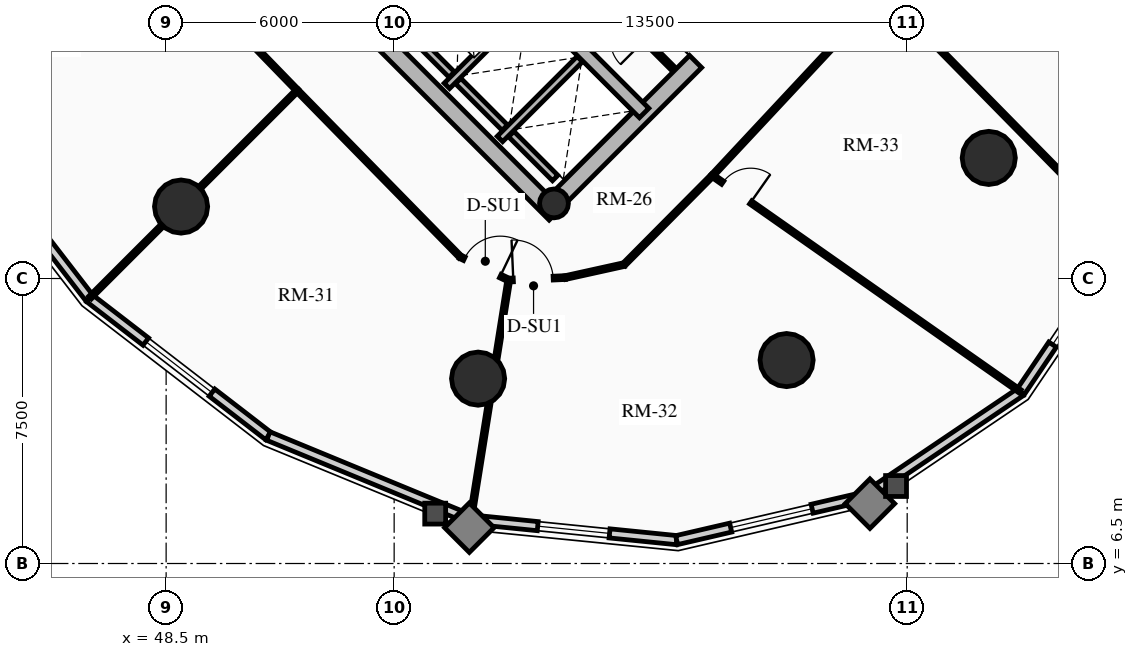
"""IFC4 building model, lengths in metres.
Left out: names, types, materials, properties, quantities, classifications, styles, units other than length and angle.
Written with IfcOpenShell. Run it as: python <this file> out.ifc"""

import sys

from ifc_helpers import new_model, si_unit, direction, frame, frame_2d, origin, origin_2d, place, context, subcontext, project, spatial, rectangle, circle, hollow_circle, extrude, source, transform, mapped, element, fill, save


model = new_model("IFC4")
c1 = context("Model", 3, precision=1e-05, world=origin(), true_north=direction((0.0, 1.0)))
c2 = subcontext(c1, "Body", "Model", "MODEL_VIEW")
j1 = project(units=[si_unit("LENGTHUNIT", "METRE"), si_unit("PLANEANGLEUNIT", "RADIAN")], contexts=[c1])
p1 = place(None, origin())
s1 = spatial("IfcSite", under=j1, at=p1, CompositionType="ELEMENT")
p2 = place(p1, origin())
s2 = spatial("IfcBuilding", under=s1, at=p2, CompositionType="ELEMENT")
p3 = place(p2, frame((0.0, 0.0, 102.16)))
s3 = spatial("IfcBuildingStorey", under=s2, at=p3, CompositionType="ELEMENT", Elevation=102.16)
p4 = place(p3, frame((58.737, 15.697, 0.0), z_axis=(0.0, 0.0, 1.0), x_axis=(-0.707106781187, 0.707106781187, 0.0)))
e1 = element("IfcWall", 1, at=p4, inside=s3, PredefinedType="SHEAR", context=c2, shape_type="SweptSolid", body=[
    extrude(rectangle(XDim=14.2, YDim=0.45, at=frame_2d((7.1, 0.0))), origin(), (0.0, 0.0, 1.0), 2.91),
])
p5 = place(p3, frame((58.578, 15.856, 0.0), z_axis=(0.0, 0.0, 1.0), x_axis=(0.707106781187, 0.707106781187, 0.0)))
e2 = element("IfcWall", 2, at=p5, inside=s3, PredefinedType="SHEAR", context=c2, shape_type="SweptSolid", body=[
    extrude(rectangle(XDim=10.7, YDim=0.45, at=frame_2d((5.35, 0.0))), origin(), (0.0, 0.0, 1.0), 2.91),
])
m1 = source(origin(), c2, "Body", "SweptSolid", [
    extrude(rectangle(XDim=1.5, YDim=2.02, at=frame_2d((0.75, 1.01))), frame((0.0, 0.235, 0.0), z_axis=(0.0, -1.0, 0.0), x_axis=(1.0, 0.0, 0.0)), (0.0, 0.0, 1.0), 0.47),
])
p6 = place(p5, frame((5.45, 0.0, 0.0)))
e3 = element("IfcOpeningElement", 3, at=p6, cuts=e2, PredefinedType="OPENING", context=c2, shape_type="MappedRepresentation", body=[
    mapped(m1, transform((0.0, 0.0, 0.0), x_axis=(1.0, 0.0, 0.0), y_axis=(0.0, 1.0, 0.0), z_axis=(0.0, 0.0, 1.0), scale=1.0)),
])
p7 = place(p3, frame((61.078, 18.355, 0.0), z_axis=(0.0, 0.0, 1.0), x_axis=(-0.707106781187, 0.707106781187, 0.0)))
e4 = element("IfcWall", 4, at=p7, inside=s3, PredefinedType="SHEAR", context=c2, shape_type="SweptSolid", body=[
    extrude(rectangle(XDim=13.75, YDim=0.35, at=frame_2d((6.875, 0.0))), origin(), (0.0, 0.0, 1.0), 2.91),
])
m2 = source(origin(), c2, "Body", "SweptSolid", [
    extrude(rectangle(XDim=1.1, YDim=2.015, at=frame_2d((0.55, 1.007))), frame((0.0, 0.185, 0.0), z_axis=(0.0, -1.0, 0.0), x_axis=(1.0, 0.0, 0.0)), (0.0, 0.0, 1.0), 0.37),
])
p8 = place(p7, frame((4.875, 0.0, 0.0)))
e5 = element("IfcOpeningElement", 5, at=p8, cuts=e4, PredefinedType="OPENING", context=c2, shape_type="MappedRepresentation", body=[
    mapped(m2, transform((0.0, 0.0, 0.0), x_axis=(1.0, 0.0, 0.0), y_axis=(0.0, 1.0, 0.0), z_axis=(0.0, 0.0, 1.0), scale=1.0)),
])
m3 = source(origin(), c2, "Body", "SweptSolid", [
    extrude(rectangle(XDim=1.15, YDim=2.02, at=frame_2d((0.575, 1.01))), frame((0.0, 0.185, 0.0), z_axis=(0.0, -1.0, 0.0), x_axis=(1.0, 0.0, 0.0)), (0.0, 0.0, 1.0), 0.37),
])
p9 = place(p7, frame((7.295, 0.0, 0.0)))
e6 = element("IfcOpeningElement", 6, at=p9, cuts=e4, PredefinedType="OPENING", context=c2, shape_type="MappedRepresentation", body=[
    mapped(m3, transform((0.0, 0.0, 0.0), x_axis=(1.0, 0.0, 0.0), y_axis=(0.0, 1.0, 0.0), z_axis=(0.0, 0.0, 1.0), scale=1.0)),
])
p10 = place(p3, frame((58.706, 15.976, 0.0), z_axis=(0.0, 0.0, 1.0), x_axis=(0.707106781187, 0.707106781187, 0.0)))
e7 = element("IfcColumn", 7, at=p10, inside=s3, PredefinedType="COLUMN", context=c2, shape_type="SweptSolid", body=[
    extrude(hollow_circle(Radius=0.38, WallThickness=0.032, at=origin_2d()), origin(), (0.0, 0.0, 1.0), 2.91),
])
for number, where, z_axis, x_axis in (
    (8, (48.893, 15.893, 0.0), (0.0, 0.0, 1.0), (1.0, 0.0, 0.0)),
    (9, (56.709, 11.365, 0.0), (0.0, 0.0, 1.0), (1.0, 0.0, 0.0)),
    (10, (64.827, 11.854, 0.0), (0.0, 0.0, 1.0), (1.0, 0.0, 0.0)),
    (11, (70.146, 17.173, 0.0), (0.0, 0.0, 1.0), (1.0, 0.0, 0.0)),
):
    element("IfcColumn", number, at=place(p3, frame(where, z_axis=z_axis, x_axis=x_axis)), inside=s3, PredefinedType="USERDEFINED", context=c2, shape_type="SweptSolid", body=[
        extrude(circle(Radius=0.7, at=origin_2d()), origin(), (0.0, 0.0, 1.0), 2.91),
    ])
p11 = place(p3, frame((46.483, 13.483, 0.0), z_axis=(0.0, 0.0, 1.0), x_axis=(-0.61054437102, 0.791982052206, 0.0)))
e12 = element("IfcWall", 12, at=p11, inside=s3, PredefinedType="SOLIDWALL", context=c2, shape_type="SweptSolid", body=[
    extrude(rectangle(XDim=5.942, YDim=0.24, at=frame_2d((2.971, 0.0))), origin(), (0.0, 0.0, 1.0), 2.179),
])
p12 = place(p3, frame((51.189, 9.855, 0.0), z_axis=(0.0, 0.0, 1.0), x_axis=(-0.791982052206, 0.61054437102, 0.0)))
e13 = element("IfcWall", 13, at=p12, inside=s3, PredefinedType="SOLIDWALL", context=c2, shape_type="SweptSolid", body=[
    extrude(rectangle(XDim=5.942, YDim=0.24, at=frame_2d((2.971, 0.0))), origin(), (0.0, 0.0, 1.0), 2.179),
])
m4 = source(origin(), c2, "Body", "SweptSolid", [
    extrude(rectangle(XDim=2.2, YDim=1.35, at=frame_2d((1.1, 0.675))), frame((0.0, 0.13, 0.0), z_axis=(0.0, -1.0, 0.0), x_axis=(1.0, 0.0, 0.0)), (0.0, 0.0, 1.0), 0.26),
])
p13 = place(p12, frame((1.871, 0.0, 0.65)))
e14 = element("IfcOpeningElement", 14, at=p13, cuts=e13, PredefinedType="OPENING", context=c2, shape_type="MappedRepresentation", body=[
    mapped(m4, transform((0.0, 0.0, 0.0), x_axis=(1.0, 0.0, 0.0), y_axis=(0.0, 1.0, 0.0), z_axis=(0.0, 0.0, 1.0), scale=1.0)),
])
p14 = place(p3, frame((56.513, 7.661, 0.0), z_axis=(0.0, 0.0, 1.0), x_axis=(-0.924563909604, 0.381027003055, 0.0)))
e15 = element("IfcWall", 15, at=p14, inside=s3, PredefinedType="SOLIDWALL", context=c2, shape_type="SweptSolid", body=[
    extrude(rectangle(XDim=5.758, YDim=0.24, at=frame_2d((2.879, 0.0))), origin(), (0.0, 0.0, 1.0), 2.179),
])
p15 = place(p3, frame((61.933, 7.115, 0.0), z_axis=(0.0, 0.0, 1.0), x_axis=(-0.994971754311, 0.10015591906, 0.0)))
e16 = element("IfcWall", 16, at=p15, inside=s3, PredefinedType="SOLIDWALL", context=c2, shape_type="SweptSolid", body=[
    extrude(rectangle(XDim=5.448, YDim=0.24, at=frame_2d((2.724, 0.0))), origin(), (0.0, 0.0, 1.0), 2.179),
])
m5 = source(origin(), c2, "Body", "SweptSolid", [
    extrude(rectangle(XDim=1.9, YDim=1.35, at=frame_2d((0.95, 0.675))), frame((0.0, 0.13, 0.0), z_axis=(0.0, -1.0, 0.0), x_axis=(1.0, 0.0, 0.0)), (0.0, 0.0, 1.0), 0.26),
])
p16 = place(p15, frame((1.774, 0.0, 0.65)))
e17 = element("IfcOpeningElement", 17, at=p16, cuts=e16, PredefinedType="OPENING", context=c2, shape_type="MappedRepresentation", body=[
    mapped(m5, transform((0.0, 0.0, 0.0), x_axis=(1.0, 0.0, 0.0), y_axis=(0.0, 1.0, 0.0), z_axis=(0.0, 0.0, 1.0), scale=1.0)),
])
p17 = place(p3, frame((66.92, 8.271, 0.0), z_axis=(0.0, 0.0, 1.0), x_axis=(-0.974165631126, -0.225834725257, 0.0)))
e18 = element("IfcWall", 18, at=p17, inside=s3, PredefinedType="SOLIDWALL", context=c2, shape_type="SweptSolid", body=[
    extrude(rectangle(XDim=5.119, YDim=0.24, at=frame_2d((2.56, 0.0))), origin(), (0.0, 0.0, 1.0), 2.179),
])
p18 = place(p17, frame((1.459, 0.0, 0.65)))
e19 = element("IfcOpeningElement", 19, at=p18, cuts=e18, PredefinedType="OPENING", context=c2, shape_type="MappedRepresentation", body=[
    mapped(m4, transform((0.0, 0.0, 0.0), x_axis=(1.0, 0.0, 0.0), y_axis=(0.0, 1.0, 0.0), z_axis=(0.0, 0.0, 1.0), scale=1.0)),
])
p19 = place(p3, frame((70.985, 11.015, 0.0), z_axis=(0.0, 0.0, 1.0), x_axis=(-0.828781148131, -0.559572880421, 0.0)))
e20 = element("IfcWall", 20, at=p19, inside=s3, PredefinedType="SOLIDWALL", context=c2, shape_type="SweptSolid", body=[
    extrude(rectangle(XDim=4.905, YDim=0.24, at=frame_2d((2.452, 0.0))), origin(), (0.0, 0.0, 1.0), 2.179),
])
p20 = place(p3, frame((73.729, 15.08, 0.0), z_axis=(0.0, 0.0, 1.0), x_axis=(-0.559572880421, -0.828781148131, 0.0)))
e21 = element("IfcWall", 21, at=p20, inside=s3, PredefinedType="SOLIDWALL", context=c2, shape_type="SweptSolid", body=[
    extrude(rectangle(XDim=4.905, YDim=0.24, at=frame_2d((2.452, 0.0))), origin(), (0.0, 0.0, 1.0), 2.179),
])
p21 = place(p20, frame((1.502, 0.0, 0.65)))
e22 = element("IfcOpeningElement", 22, at=p21, cuts=e21, PredefinedType="OPENING", context=c2, shape_type="MappedRepresentation", body=[
    mapped(m5, transform((0.0, 0.0, 0.0), x_axis=(1.0, 0.0, 0.0), y_axis=(0.0, 1.0, 0.0), z_axis=(0.0, 0.0, 1.0), scale=1.0)),
])
p22 = place(p3, frame((55.888, 19.069, 0.0), z_axis=(0.0, 0.0, 1.0), x_axis=(0.707106781187, 0.707106781187, 0.0)))
e23 = element("IfcWall", 23, at=p22, inside=s3, PredefinedType="SHEAR", context=c2, shape_type="SweptSolid", body=[
    extrude(rectangle(XDim=2.97, YDim=0.2, at=frame_2d((1.485, 0.0))), origin(), (0.0, 0.0, 1.0), 2.91),
])
p23 = place(p3, frame((56.015, 19.366, 0.0), z_axis=(0.0, 0.0, 1.0), x_axis=(-0.707106781187, 0.707106781187, 0.0)))
e24 = element("IfcWall", 24, at=p23, inside=s3, PredefinedType="SHEAR", context=c2, shape_type="SweptSolid", body=[
    extrude(rectangle(XDim=2.44, YDim=0.2, at=frame_2d((1.22, 0.0))), origin(), (0.0, 0.0, 1.0), 2.91),
])
p24 = place(p3, frame((57.284, 17.673, 0.0), z_axis=(0.0, 0.0, 1.0), x_axis=(0.707147878904, 0.70706568108, 0.0)))
e25 = element("IfcWall", 25, at=p24, inside=s3, PredefinedType="SHEAR", context=c2, shape_type="SweptSolid", body=[
    extrude(rectangle(XDim=2.97, YDim=0.2, at=frame_2d((1.485, 0.0))), origin(), (0.0, 0.0, 1.0), 2.91),
])
p25 = place(p3, frame((57.412, 17.97, 0.0), z_axis=(0.0, 0.0, 1.0), x_axis=(-0.707106781187, 0.707106781187, 0.0)))
e26 = element("IfcWall", 26, at=p25, inside=s3, PredefinedType="SHEAR", context=c2, shape_type="SweptSolid", body=[
    extrude(rectangle(XDim=1.735, YDim=0.2, at=frame_2d((0.867, 0.0))), origin(), (0.0, 0.0, 1.0), 2.91),
])
p26 = place(p3, frame((58.737, 16.644, 0.0), z_axis=(0.0, 0.0, 1.0), x_axis=(-0.707032117043, 0.707181437447, 0.0)))
e27 = element("IfcWall", 27, at=p26, inside=s3, PredefinedType="SHEAR", context=c2, shape_type="SweptSolid", body=[
    extrude(rectangle(XDim=1.635, YDim=0.2, at=frame_2d((0.817, 0.0))), origin(), (0.0, 0.0, 1.0), 2.91),
])
p27 = place(p3, frame((61.835, 19.529, 0.0), z_axis=(0.0, 0.0, 1.0), x_axis=(-0.707146413884, 0.707067146267, 0.0)))
e28 = element("IfcWall", 28, at=p27, inside=s3, PredefinedType="PARTITIONING", context=c2, shape_type="SweptSolid", body=[
    extrude(rectangle(XDim=3.08, YDim=0.125, at=frame_2d((1.54, 0.0))), origin(), (0.0, 0.0, 1.0), 2.655),
])
m6 = source(origin(), c2, "Body", "SweptSolid", [
    extrude(rectangle(XDim=0.9, YDim=2.005, at=frame_2d((0.45, 1.002))), frame((0.0, 0.073, 0.0), z_axis=(0.0, -1.0, 0.0), x_axis=(1.0, 0.0, 0.0)), (0.0, 0.0, 1.0), 0.145),
])
p28 = place(p27, frame((1.05, 0.0, 0.0)))
e29 = element("IfcOpeningElement", 29, at=p28, cuts=e28, PredefinedType="OPENING", context=c2, shape_type="MappedRepresentation", body=[
    mapped(m6, transform((0.0, 0.0, 0.0), x_axis=(1.0, 0.0, 0.0), y_axis=(0.0, 1.0, 0.0), z_axis=(0.0, 0.0, 1.0), scale=1.0)),
])
p29 = place(p3, frame((47.763, 23.265, 0.0), z_axis=(0.0, 0.0, 1.0), x_axis=(0.696243493404, -0.717805682544, 0.0)))
e30 = element("IfcWall", 30, at=p29, inside=s3, PredefinedType="MOVABLE", context=c2, shape_type="SweptSolid", body=[
    extrude(rectangle(XDim=6.012, YDim=0.1, at=frame_2d((3.006, 0.0))), origin(), (0.0, 0.0, 1.0), 2.655),
])
m7 = source(origin(), c2, "Body", "SweptSolid", [
    extrude(rectangle(XDim=1.05, YDim=2.015, at=frame_2d((0.525, 1.007))), frame((0.0, 0.06, 0.0), z_axis=(0.0, -1.0, 0.0), x_axis=(1.0, 0.0, 0.0)), (0.0, 0.0, 1.0), 0.12),
])
p30 = place(p29, frame((2.481, 0.0, 0.0)))
e31 = element("IfcOpeningElement", 31, at=p30, cuts=e30, PredefinedType="OPENING", context=c2, shape_type="MappedRepresentation", body=[
    mapped(m7, transform((0.0, 0.0, 0.0), x_axis=(1.0, 0.0, 0.0), y_axis=(0.0, 1.0, 0.0), z_axis=(0.0, 0.0, 1.0), scale=1.0)),
])
p31 = place(p3, frame((51.949, 18.949, 0.0), z_axis=(0.0, 0.0, 1.0), x_axis=(0.699840807936, -0.714298847506, 0.0)))
e32 = element("IfcWall", 32, at=p31, inside=s3, PredefinedType="MOVABLE", context=c2, shape_type="SweptSolid", body=[
    extrude(rectangle(XDim=6.13, YDim=0.1, at=frame_2d((3.065, 0.0))), origin(), (0.0, 0.0, 1.0), 2.225),
])
p32 = place(p3, frame((56.239, 14.571, 0.0), z_axis=(0.0, 0.0, 1.0), x_axis=(0.901549955153, -0.432675026278, 0.0)))
e33 = element("IfcWall", 33, at=p32, inside=s3, PredefinedType="MOVABLE", context=c2, shape_type="SweptSolid", body=[
    extrude(rectangle(XDim=1.416, YDim=0.1, at=frame_2d((0.708, 0.0))), origin(), (0.0, 0.0, 1.0), 2.225),
])
p33 = place(p32, frame((0.12, 0.0, 0.0)))
e34 = element("IfcOpeningElement", 34, at=p33, cuts=e33, PredefinedType="OPENING", context=c2, shape_type="MappedRepresentation", body=[
    mapped(m7, transform((0.0, 0.0, 0.0), x_axis=(1.0, 0.0, 0.0), y_axis=(0.0, 1.0, 0.0), z_axis=(0.0, 0.0, 1.0), scale=1.0)),
])
p34 = place(p3, frame((57.516, 13.958, 0.0), z_axis=(0.0, 0.0, 1.0), x_axis=(0.999005711776, 0.044582371387, 0.0)))
e35 = element("IfcWall", 35, at=p34, inside=s3, PredefinedType="MOVABLE", context=c2, shape_type="SweptSolid", body=[
    extrude(rectangle(XDim=1.49, YDim=0.1, at=frame_2d((0.745, 0.0))), origin(), (0.0, 0.0, 1.0), 2.225),
])
p35 = place(p34, frame((0.12, 0.0, 0.0)))
e36 = element("IfcOpeningElement", 36, at=p35, cuts=e35, PredefinedType="OPENING", context=c2, shape_type="MappedRepresentation", body=[
    mapped(m7, transform((0.0, 0.0, 0.0), x_axis=(1.0, 0.0, 0.0), y_axis=(0.0, 1.0, 0.0), z_axis=(0.0, 0.0, 1.0), scale=1.0)),
])
p36 = place(p3, frame((59.004, 14.024, 0.0), z_axis=(0.0, 0.0, 1.0), x_axis=(0.976436847881, 0.215803341262, 0.0)))
e37 = element("IfcWall", 37, at=p36, inside=s3, PredefinedType="MOVABLE", context=c2, shape_type="SweptSolid", body=[
    extrude(rectangle(XDim=1.583, YDim=0.1, at=frame_2d((0.792, 0.0))), origin(), (0.0, 0.0, 1.0), 2.225),
])
p37 = place(p3, frame((60.549, 14.366, 0.0), z_axis=(0.0, 0.0, 1.0), x_axis=(0.704402344516, 0.709800913666, 0.0)))
e38 = element("IfcWall", 38, at=p37, inside=s3, PredefinedType="MOVABLE", context=c2, shape_type="SweptSolid", body=[
    extrude(rectangle(XDim=3.301, YDim=0.1, at=frame_2d((1.651, 0.0))), origin(), (0.0, 0.0, 1.0), 2.225),
])
p38 = place(p3, frame((62.875, 16.709, 0.0), z_axis=(0.0, 0.0, 1.0), x_axis=(0.682290572861, 0.731081099595, 0.0)))
e39 = element("IfcWall", 39, at=p38, inside=s3, PredefinedType="MOVABLE", context=c2, shape_type="SweptSolid", body=[
    extrude(rectangle(XDim=6.6, YDim=0.1, at=frame_2d((3.3, 0.0))), origin(), (0.0, 0.0, 1.0), 2.225),
])
p39 = place(p3, frame((51.949, 18.949, 0.0), z_axis=(0.0, 0.0, 1.0), x_axis=(-0.707106781187, -0.707106781187, 0.0)))
e40 = element("IfcWall", 40, at=p39, inside=s3, PredefinedType="MOVABLE", context=c2, shape_type="SweptSolid", body=[
    extrude(rectangle(XDim=7.711, YDim=0.1, at=frame_2d((3.855, 0.0))), origin(), (0.0, 0.0, 1.0), 2.179),
])
p40 = place(p3, frame((57.516, 13.958, 0.0), z_axis=(0.0, 0.0, 1.0), x_axis=(-0.157313405462, -0.987548729158, 0.0)))
e41 = element("IfcWall", 41, at=p40, inside=s3, PredefinedType="MOVABLE", context=c2, shape_type="SweptSolid", body=[
    extrude(rectangle(XDim=6.357, YDim=0.1, at=frame_2d((3.178, 0.0))), origin(), (0.0, 0.0, 1.0), 2.179),
])
p41 = place(p3, frame((67.378, 21.534, 0.0), z_axis=(0.0, 0.0, 1.0), x_axis=(0.700878918497, -0.713280268622, 0.0)))
e42 = element("IfcWall", 42, at=p41, inside=s3, PredefinedType="MOVABLE", context=c2, shape_type="SweptSolid", body=[
    extrude(rectangle(XDim=9.036, YDim=0.1, at=frame_2d((4.518, 0.0))), origin(), (0.0, 0.0, 1.0), 2.179),
])
p42 = place(p3, frame((62.875, 16.709, 0.0), z_axis=(0.0, 0.0, 1.0), x_axis=(0.818628370173, -0.574323594804, 0.0)))
e43 = element("IfcWall", 43, at=p42, inside=s3, PredefinedType="MOVABLE", context=c2, shape_type="SweptSolid", body=[
    extrude(rectangle(XDim=9.889, YDim=0.1, at=frame_2d((4.945, 0.0))), origin(), (0.0, 0.0, 1.0), 2.179),
])
m8 = source(origin(), c2, "Body", "SweptSolid", [
    extrude(rectangle(XDim=0.9, YDim=2.005, at=frame_2d((0.45, 1.002))), frame((0.0, 0.06, 0.0), z_axis=(0.0, -1.0, 0.0), x_axis=(1.0, 0.0, 0.0)), (0.0, 0.0, 1.0), 0.12),
])
p43 = place(p42, frame((0.33, 0.0, 0.0)))
e44 = element("IfcOpeningElement", 44, at=p43, cuts=e43, PredefinedType="OPENING", context=c2, shape_type="MappedRepresentation", body=[
    mapped(m8, transform((0.0, 0.0, 0.0), x_axis=(1.0, 0.0, 0.0), y_axis=(0.0, 1.0, 0.0), z_axis=(0.0, 0.0, 1.0), scale=1.0)),
])
m9 = source(origin(), c2, "Body", "SweptSolid", [
    extrude(rectangle(XDim=2.2, YDim=1.35, at=frame_2d((1.1, 0.675))), frame((0.0, 0.03, 0.0), z_axis=(0.0, -1.0, 0.0), x_axis=(1.0, 0.0, 0.0)), (0.0, 0.0, 1.0), 0.06),
])
p44 = place(p13, origin())
e45 = element("IfcWindow", 45, at=p44, inside=s3, PartitioningType="DOUBLE_PANEL_VERTICAL", PredefinedType="WINDOW", context=c2, shape_type="MappedRepresentation", body=[
    mapped(m9, transform((0.0, 0.0, 0.0), x_axis=(1.0, 0.0, 0.0), y_axis=(0.0, 1.0, 0.0), z_axis=(0.0, 0.0, 1.0), scale=1.0)),
])
fill(e14, e45)
m10 = source(origin(), c2, "Body", "SweptSolid", [
    extrude(rectangle(XDim=1.9, YDim=1.35, at=frame_2d((0.95, 0.675))), frame((0.0, 0.03, 0.0), z_axis=(0.0, -1.0, 0.0), x_axis=(1.0, 0.0, 0.0)), (0.0, 0.0, 1.0), 0.06),
])
p45 = place(p16, origin())
e46 = element("IfcWindow", 46, at=p45, inside=s3, PartitioningType="DOUBLE_PANEL_VERTICAL", PredefinedType="WINDOW", context=c2, shape_type="MappedRepresentation", body=[
    mapped(m10, transform((0.0, 0.0, 0.0), x_axis=(1.0, 0.0, 0.0), y_axis=(0.0, 1.0, 0.0), z_axis=(0.0, 0.0, 1.0), scale=1.0)),
])
fill(e17, e46)
p46 = place(p18, origin())
e47 = element("IfcWindow", 47, at=p46, inside=s3, PartitioningType="DOUBLE_PANEL_VERTICAL", PredefinedType="WINDOW", context=c2, shape_type="MappedRepresentation", body=[
    mapped(m9, transform((0.0, 0.0, 0.0), x_axis=(1.0, 0.0, 0.0), y_axis=(0.0, 1.0, 0.0), z_axis=(0.0, 0.0, 1.0), scale=1.0)),
])
fill(e19, e47)
p47 = place(p21, origin())
e48 = element("IfcWindow", 48, at=p47, inside=s3, PartitioningType="DOUBLE_PANEL_VERTICAL", PredefinedType="WINDOW", context=c2, shape_type="MappedRepresentation", body=[
    mapped(m10, transform((0.0, 0.0, 0.0), x_axis=(1.0, 0.0, 0.0), y_axis=(0.0, 1.0, 0.0), z_axis=(0.0, 0.0, 1.0), scale=1.0)),
])
fill(e22, e48)
m11 = source(origin(), c2, "Body", "SweptSolid", [
    extrude(rectangle(XDim=1.5, YDim=2.02, at=frame_2d((0.75, 1.01))), frame((0.0, 0.025, 0.0), z_axis=(0.0, -1.0, 0.0), x_axis=(1.0, 0.0, 0.0)), (0.0, 0.0, 1.0), 0.05),
])
p48 = place(p6, origin())
e49 = element("IfcDoor", 49, at=p48, inside=s3, OperationType="DOUBLE_DOOR_SINGLE_SWING", PredefinedType="DOOR", context=c2, shape_type="MappedRepresentation", body=[
    mapped(m11, transform((0.0, 0.0, 0.0), x_axis=(1.0, 0.0, 0.0), y_axis=(0.0, 1.0, 0.0), z_axis=(0.0, 0.0, 1.0), scale=1.0)),
])
fill(e3, e49)
m12 = source(origin(), c2, "Body", "SweptSolid", [
    extrude(rectangle(XDim=1.05, YDim=2.015, at=frame_2d((0.525, 1.007))), frame((0.0, 0.025, 0.0), z_axis=(0.0, -1.0, 0.0), x_axis=(1.0, 0.0, 0.0)), (0.0, 0.0, 1.0), 0.05),
])
p49 = place(p33, origin())
e50 = element("IfcDoor", 50, at=p49, inside=s3, OperationType="SINGLE_SWING_RIGHT", PredefinedType="DOOR", context=c2, shape_type="MappedRepresentation", body=[
    mapped(m12, transform((0.0, 0.0, 0.0), x_axis=(1.0, 0.0, 0.0), y_axis=(0.0, 1.0, 0.0), z_axis=(0.0, 0.0, 1.0), scale=1.0)),
])
fill(e34, e50)
p50 = place(p35, origin())
e51 = element("IfcDoor", 51, at=p50, inside=s3, OperationType="SINGLE_SWING_LEFT", PredefinedType="DOOR", context=c2, shape_type="MappedRepresentation", body=[
    mapped(m12, transform((0.0, 0.0, 0.0), x_axis=(1.0, 0.0, 0.0), y_axis=(0.0, 1.0, 0.0), z_axis=(0.0, 0.0, 1.0), scale=1.0)),
])
fill(e36, e51)
m13 = source(origin(), c2, "Body", "SweptSolid", [
    extrude(rectangle(XDim=0.9, YDim=2.005, at=frame_2d((0.45, 1.002))), frame((0.0, 0.025, 0.0), z_axis=(0.0, -1.0, 0.0), x_axis=(1.0, 0.0, 0.0)), (0.0, 0.0, 1.0), 0.05),
])
p51 = place(p43, origin())
e52 = element("IfcDoor", 52, at=p51, inside=s3, OperationType="SINGLE_SWING_RIGHT", PredefinedType="DOOR", context=c2, shape_type="MappedRepresentation", body=[
    mapped(m13, transform((0.0, 0.0, 0.0), x_axis=(1.0, 0.0, 0.0), y_axis=(0.0, 1.0, 0.0), z_axis=(0.0, 0.0, 1.0), scale=1.0)),
])
fill(e44, e52)
save(model, sys.argv[1])
